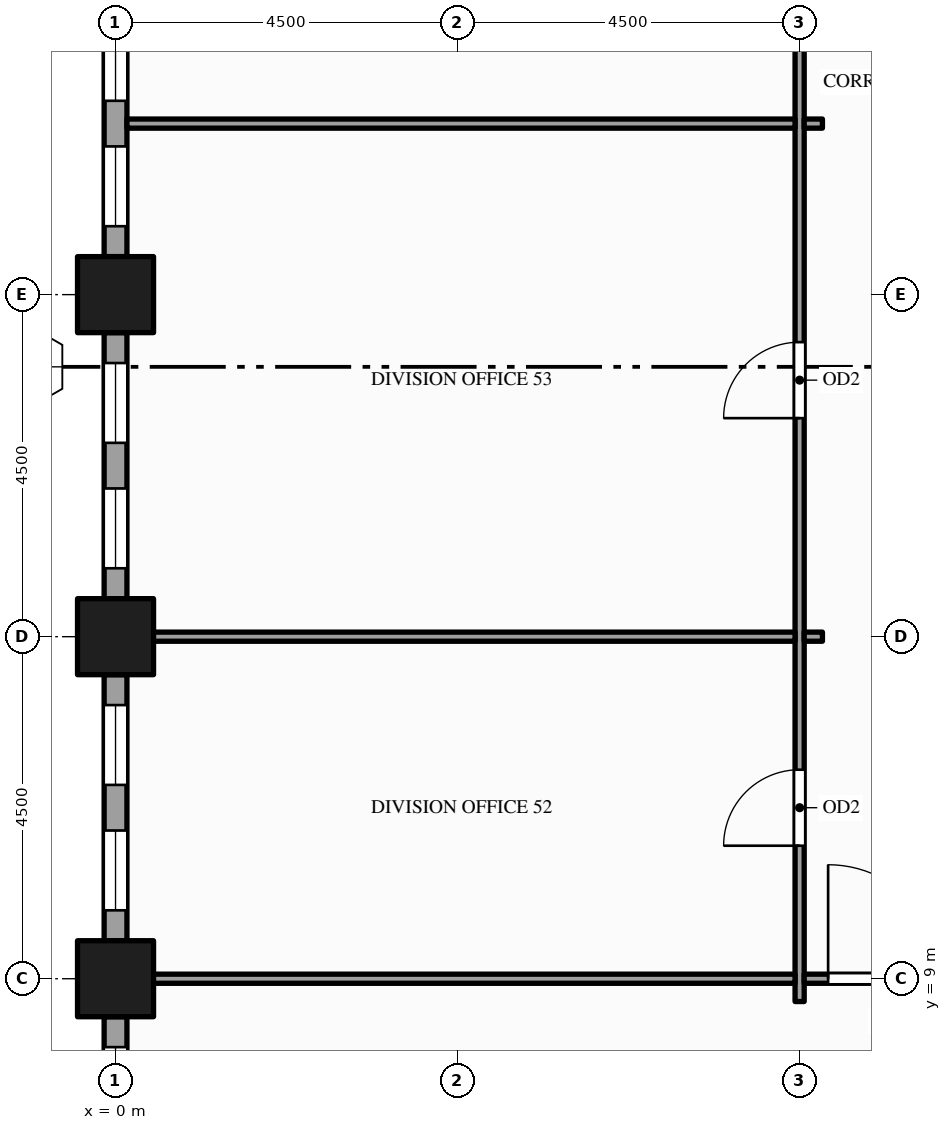
"""IFC4 building model, lengths in metres.
Left out: names, types, materials, properties, quantities, classifications, styles, units other than length and angle.
Written with IfcOpenShell. Run it as: python <this file> out.ifc"""

import sys

from ifc_helpers import new_model, si_unit, direction, frame, frame_2d, origin, origin_2d, place, context, subcontext, project, spatial, rectangle, hollow_rectangle, extrude, element, fill, save


model = new_model("IFC4")
c1 = context("Model", 3, precision=1e-05, world=origin(), true_north=direction((0.0, 1.0)))
c2 = subcontext(c1, "Body", "Model", "MODEL_VIEW")
j1 = project(units=[si_unit("LENGTHUNIT", "METRE"), si_unit("PLANEANGLEUNIT", "RADIAN")], contexts=[c1])
p1 = place(None, origin())
s1 = spatial("IfcSite", under=j1, at=p1, CompositionType="ELEMENT")
p2 = place(p1, origin())
s2 = spatial("IfcBuilding", under=s1, at=p2, CompositionType="ELEMENT")
p3 = place(p2, frame((0.0, 0.0, 103.0)))
s3 = spatial("IfcBuildingStorey", under=s2, at=p3, CompositionType="ELEMENT", Elevation=103.0)
for number, where, z_axis, x_axis in (
    (1, (0.0, 9.0, -0.15), (0.0, 0.0, 1.0), (1.0, 0.0, 0.0)),
    (2, (0.0, 13.5, -0.15), (0.0, 0.0, 1.0), (1.0, 0.0, 0.0)),
    (3, (0.0, 18.0, -0.15), (0.0, 0.0, 1.0), (1.0, 0.0, 0.0)),
):
    element("IfcColumn", number, at=place(p3, frame(where, z_axis=z_axis, x_axis=x_axis)), inside=s3, PredefinedType="COLUMN", context=c2, shape_type="SweptSolid", body=[
        extrude(hollow_rectangle(XDim=1.0, YDim=1.0, WallThickness=0.05, at=origin_2d()), origin(), (0.0, 0.0, 1.0), 4.0),
    ])
p4 = place(p3, frame((0.0, 22.0, 0.0), z_axis=(0.0, 0.0, 1.0), x_axis=(0.0, -1.0, 0.0)))
e4 = element("IfcWall", 4, at=p4, inside=s3, PredefinedType="STANDARD", context=c2, shape_type="SweptSolid", body=[
    extrude(rectangle(XDim=3.5, YDim=0.3, at=frame_2d((1.75, 0.0))), origin(), (0.0, 0.0, 1.0), 3.154),
])
p5 = place(p4, frame((0.4, 0.0, 0.9)))
e5 = element("IfcOpeningElement", 5, at=p5, cuts=e4, PredefinedType="OPENING", context=c2, shape_type="SweptSolid", body=[
    extrude(rectangle(XDim=1.05, YDim=2.0, at=frame_2d((0.525, 1.0))), frame((0.0, 0.16, 0.0), z_axis=(0.0, -1.0, 0.0), x_axis=(1.0, 0.0, 0.0)), (0.0, 0.0, 1.0), 0.32),
])
p6 = place(p4, frame((2.05, 0.0, 0.9)))
e6 = element("IfcOpeningElement", 6, at=p6, cuts=e4, PredefinedType="OPENING", context=c2, shape_type="SweptSolid", body=[
    extrude(rectangle(XDim=1.05, YDim=2.0, at=frame_2d((0.525, 1.0))), frame((0.0, 0.16, 0.0), z_axis=(0.0, -1.0, 0.0), x_axis=(1.0, 0.0, 0.0)), (0.0, 0.0, 1.0), 0.32),
])
p7 = place(p3, frame((0.0, 17.5, 0.0), z_axis=(0.0, 0.0, 1.0), x_axis=(0.0, -1.0, 0.0)))
e7 = element("IfcWall", 7, at=p7, inside=s3, PredefinedType="STANDARD", context=c2, shape_type="SweptSolid", body=[
    extrude(rectangle(XDim=3.5, YDim=0.3, at=frame_2d((1.75, 0.0))), origin(), (0.0, 0.0, 1.0), 3.154),
])
p8 = place(p7, frame((0.4, 0.0, 0.9)))
e8 = element("IfcOpeningElement", 8, at=p8, cuts=e7, PredefinedType="OPENING", context=c2, shape_type="SweptSolid", body=[
    extrude(rectangle(XDim=1.05, YDim=2.0, at=frame_2d((0.525, 1.0))), frame((0.0, 0.16, 0.0), z_axis=(0.0, -1.0, 0.0), x_axis=(1.0, 0.0, 0.0)), (0.0, 0.0, 1.0), 0.32),
])
p9 = place(p7, frame((2.05, 0.0, 0.9)))
e9 = element("IfcOpeningElement", 9, at=p9, cuts=e7, PredefinedType="OPENING", context=c2, shape_type="SweptSolid", body=[
    extrude(rectangle(XDim=1.05, YDim=2.0, at=frame_2d((0.525, 1.0))), frame((0.0, 0.16, 0.0), z_axis=(0.0, -1.0, 0.0), x_axis=(1.0, 0.0, 0.0)), (0.0, 0.0, 1.0), 0.32),
])
p10 = place(p3, frame((0.0, 13.0, 0.0), z_axis=(0.0, 0.0, 1.0), x_axis=(0.0, -1.0, 0.0)))
e10 = element("IfcWall", 10, at=p10, inside=s3, PredefinedType="STANDARD", context=c2, shape_type="SweptSolid", body=[
    extrude(rectangle(XDim=3.5, YDim=0.3, at=frame_2d((1.75, 0.0))), origin(), (0.0, 0.0, 1.0), 3.154),
])
p11 = place(p10, frame((0.4, 0.0, 0.9)))
e11 = element("IfcOpeningElement", 11, at=p11, cuts=e10, PredefinedType="OPENING", context=c2, shape_type="SweptSolid", body=[
    extrude(rectangle(XDim=1.05, YDim=2.0, at=frame_2d((0.525, 1.0))), frame((0.0, 0.16, 0.0), z_axis=(0.0, -1.0, 0.0), x_axis=(1.0, 0.0, 0.0)), (0.0, 0.0, 1.0), 0.32),
])
p12 = place(p10, frame((2.05, 0.0, 0.9)))
e12 = element("IfcOpeningElement", 12, at=p12, cuts=e10, PredefinedType="OPENING", context=c2, shape_type="SweptSolid", body=[
    extrude(rectangle(XDim=1.05, YDim=2.0, at=frame_2d((0.525, 1.0))), frame((0.0, 0.16, 0.0), z_axis=(0.0, -1.0, 0.0), x_axis=(1.0, 0.0, 0.0)), (0.0, 0.0, 1.0), 0.32),
])
p13 = place(p3, frame((0.0, 8.5, 0.0), z_axis=(0.0, 0.0, 1.0), x_axis=(0.0, -1.0, 0.0)))
e13 = element("IfcWall", 13, at=p13, inside=s3, PredefinedType="STANDARD", context=c2, shape_type="SweptSolid", body=[
    extrude(rectangle(XDim=3.5, YDim=0.3, at=frame_2d((1.75, 0.0))), origin(), (0.0, 0.0, 1.0), 3.154),
])
p14 = place(p13, frame((0.4, 0.0, 0.9)))
e14 = element("IfcOpeningElement", 14, at=p14, cuts=e13, PredefinedType="OPENING", context=c2, shape_type="SweptSolid", body=[
    extrude(rectangle(XDim=1.05, YDim=2.0, at=frame_2d((0.525, 1.0))), frame((0.0, 0.16, 0.0), z_axis=(0.0, -1.0, 0.0), x_axis=(1.0, 0.0, 0.0)), (0.0, 0.0, 1.0), 0.32),
])
p15 = place(p13, frame((2.05, 0.0, 0.9)))
e15 = element("IfcOpeningElement", 15, at=p15, cuts=e13, PredefinedType="OPENING", context=c2, shape_type="SweptSolid", body=[
    extrude(rectangle(XDim=1.05, YDim=2.0, at=frame_2d((0.525, 1.0))), frame((0.0, 0.16, 0.0), z_axis=(0.0, -1.0, 0.0), x_axis=(1.0, 0.0, 0.0)), (0.0, 0.0, 1.0), 0.32),
])
p16 = place(p3, frame((9.0, 8.7, 0.0), z_axis=(0.0, 0.0, 1.0), x_axis=(0.0, 1.0, 0.0)))
e16 = element("IfcWall", 16, at=p16, inside=s3, PredefinedType="PARTITIONING", context=c2, shape_type="SweptSolid", body=[
    extrude(rectangle(XDim=23.1, YDim=0.12, at=frame_2d((11.55, 0.0))), origin(), (0.0, 0.0, 1.0), 2.6),
])
p17 = place(p16, frame((2.05, 0.0, 0.0)))
e17 = element("IfcOpeningElement", 17, at=p17, cuts=e16, PredefinedType="OPENING", context=c2, shape_type="SweptSolid", body=[
    extrude(rectangle(XDim=1.0, YDim=2.1, at=frame_2d((0.5, 1.05))), frame((0.0, 0.07, 0.0), z_axis=(0.0, -1.0, 0.0), x_axis=(1.0, 0.0, 0.0)), (0.0, 0.0, 1.0), 0.14),
])
p18 = place(p16, frame((7.675, 0.0, 0.0)))
e18 = element("IfcOpeningElement", 18, at=p18, cuts=e16, PredefinedType="OPENING", context=c2, shape_type="SweptSolid", body=[
    extrude(rectangle(XDim=1.0, YDim=2.1, at=frame_2d((0.5, 1.05))), frame((0.0, 0.07, 0.0), z_axis=(0.0, -1.0, 0.0), x_axis=(1.0, 0.0, 0.0)), (0.0, 0.0, 1.0), 0.14),
])
p19 = place(p16, frame((14.355, 0.0, 0.0)))
e19 = element("IfcOpeningElement", 19, at=p19, cuts=e16, PredefinedType="OPENING", context=c2, shape_type="SweptSolid", body=[
    extrude(rectangle(XDim=1.2, YDim=2.1, at=frame_2d((0.6, 1.05))), frame((0.0, 0.07, 0.0), z_axis=(0.0, -1.0, 0.0), x_axis=(1.0, 0.0, 0.0)), (0.0, 0.0, 1.0), 0.14),
])
p20 = place(p3, frame((0.15, 9.0, 0.0), z_axis=(0.0, 0.0, 1.0), x_axis=(1.0, 0.0, 0.0)))
e20 = element("IfcWall", 20, at=p20, inside=s3, PredefinedType="PARTITIONING", context=c2, shape_type="SweptSolid", body=[
    extrude(rectangle(XDim=8.79, YDim=0.12, at=frame_2d((4.395, 0.0))), origin(), (0.0, 0.0, 1.0), 2.938),
])
p21 = place(p3, frame((9.06, 9.0, 0.0), z_axis=(0.0, 0.0, 1.0), x_axis=(1.0, 0.0, 0.0)))
e21 = element("IfcWall", 21, at=p21, inside=s3, PredefinedType="PARTITIONING", context=c2, shape_type="SweptSolid", body=[
    extrude(rectangle(XDim=2.13, YDim=0.12, at=frame_2d((1.065, 0.0))), origin(), (0.0, 0.0, 1.0), 2.938),
])
p22 = place(p21, frame((0.315, 0.0, 0.0)))
e22 = element("IfcOpeningElement", 22, at=p22, cuts=e21, PredefinedType="OPENING", context=c2, shape_type="SweptSolid", body=[
    extrude(rectangle(XDim=1.5, YDim=2.1, at=frame_2d((0.75, 1.05))), frame((0.0, 0.07, 0.0), z_axis=(0.0, -1.0, 0.0), x_axis=(1.0, 0.0, 0.0)), (0.0, 0.0, 1.0), 0.14),
])
p23 = place(p3, frame((0.15, 13.5, 0.0), z_axis=(0.0, 0.0, 1.0), x_axis=(1.0, 0.0, 0.0)))
e23 = element("IfcWall", 23, at=p23, inside=s3, PredefinedType="PARTITIONING", context=c2, shape_type="SweptSolid", body=[
    extrude(rectangle(XDim=8.79, YDim=0.12, at=frame_2d((4.395, 0.0))), origin(), (0.0, 0.0, 1.0), 2.938),
])
p24 = place(p3, frame((9.06, 13.5, 0.0), z_axis=(0.0, 0.0, 1.0), x_axis=(1.0, 0.0, 0.0)))
e24 = element("IfcWall", 24, at=p24, inside=s3, PredefinedType="PARTITIONING", context=c2, shape_type="SweptSolid", body=[
    extrude(rectangle(XDim=0.24, YDim=0.12, at=frame_2d((0.12, 0.0))), origin(), (0.0, 0.0, 1.0), 2.938),
])
p25 = place(p3, frame((0.15, 20.25, 0.0), z_axis=(0.0, 0.0, 1.0), x_axis=(1.0, 0.0, 0.0)))
e25 = element("IfcWall", 25, at=p25, inside=s3, PredefinedType="PARTITIONING", context=c2, shape_type="SweptSolid", body=[
    extrude(rectangle(XDim=8.79, YDim=0.12, at=frame_2d((4.395, 0.0))), origin(), (0.0, 0.0, 1.0), 2.938),
])
p26 = place(p3, frame((9.06, 20.25, 0.0), z_axis=(0.0, 0.0, 1.0), x_axis=(1.0, 0.0, 0.0)))
e26 = element("IfcWall", 26, at=p26, inside=s3, PredefinedType="PARTITIONING", context=c2, shape_type="SweptSolid", body=[
    extrude(rectangle(XDim=0.24, YDim=0.12, at=frame_2d((0.12, 0.0))), origin(), (0.0, 0.0, 1.0), 2.938),
])
p27 = place(p5, origin())
e27 = element("IfcWindow", 27, at=p27, inside=s3, PartitioningType="SINGLE_PANEL", PredefinedType="WINDOW", context=c2, shape_type="SweptSolid", body=[
    extrude(rectangle(XDim=1.05, YDim=2.0, at=frame_2d((0.525, 1.0))), frame((0.0, 0.03, 0.0), z_axis=(0.0, -1.0, 0.0), x_axis=(1.0, 0.0, 0.0)), (0.0, 0.0, 1.0), 0.06),
])
fill(e5, e27)
p28 = place(p6, origin())
e28 = element("IfcWindow", 28, at=p28, inside=s3, PartitioningType="SINGLE_PANEL", PredefinedType="WINDOW", context=c2, shape_type="SweptSolid", body=[
    extrude(rectangle(XDim=1.05, YDim=2.0, at=frame_2d((0.525, 1.0))), frame((0.0, 0.03, 0.0), z_axis=(0.0, -1.0, 0.0), x_axis=(1.0, 0.0, 0.0)), (0.0, 0.0, 1.0), 0.06),
])
fill(e6, e28)
p29 = place(p8, origin())
e29 = element("IfcWindow", 29, at=p29, inside=s3, PartitioningType="SINGLE_PANEL", PredefinedType="WINDOW", context=c2, shape_type="SweptSolid", body=[
    extrude(rectangle(XDim=1.05, YDim=2.0, at=frame_2d((0.525, 1.0))), frame((0.0, 0.03, 0.0), z_axis=(0.0, -1.0, 0.0), x_axis=(1.0, 0.0, 0.0)), (0.0, 0.0, 1.0), 0.06),
])
fill(e8, e29)
p30 = place(p9, origin())
e30 = element("IfcWindow", 30, at=p30, inside=s3, PartitioningType="SINGLE_PANEL", PredefinedType="WINDOW", context=c2, shape_type="SweptSolid", body=[
    extrude(rectangle(XDim=1.05, YDim=2.0, at=frame_2d((0.525, 1.0))), frame((0.0, 0.03, 0.0), z_axis=(0.0, -1.0, 0.0), x_axis=(1.0, 0.0, 0.0)), (0.0, 0.0, 1.0), 0.06),
])
fill(e9, e30)
p31 = place(p11, origin())
e31 = element("IfcWindow", 31, at=p31, inside=s3, PartitioningType="SINGLE_PANEL", PredefinedType="WINDOW", context=c2, shape_type="SweptSolid", body=[
    extrude(rectangle(XDim=1.05, YDim=2.0, at=frame_2d((0.525, 1.0))), frame((0.0, 0.03, 0.0), z_axis=(0.0, -1.0, 0.0), x_axis=(1.0, 0.0, 0.0)), (0.0, 0.0, 1.0), 0.06),
])
fill(e11, e31)
p32 = place(p12, origin())
e32 = element("IfcWindow", 32, at=p32, inside=s3, PartitioningType="SINGLE_PANEL", PredefinedType="WINDOW", context=c2, shape_type="SweptSolid", body=[
    extrude(rectangle(XDim=1.05, YDim=2.0, at=frame_2d((0.525, 1.0))), frame((0.0, 0.03, 0.0), z_axis=(0.0, -1.0, 0.0), x_axis=(1.0, 0.0, 0.0)), (0.0, 0.0, 1.0), 0.06),
])
fill(e12, e32)
p33 = place(p14, origin())
e33 = element("IfcWindow", 33, at=p33, inside=s3, PartitioningType="SINGLE_PANEL", PredefinedType="WINDOW", context=c2, shape_type="SweptSolid", body=[
    extrude(rectangle(XDim=1.05, YDim=2.0, at=frame_2d((0.525, 1.0))), frame((0.0, 0.03, 0.0), z_axis=(0.0, -1.0, 0.0), x_axis=(1.0, 0.0, 0.0)), (0.0, 0.0, 1.0), 0.06),
])
fill(e14, e33)
p34 = place(p22, origin())
e34 = element("IfcDoor", 34, at=p34, inside=s3, OperationType="SINGLE_SWING_LEFT", PredefinedType="DOOR", context=c2, shape_type="SweptSolid", body=[
    extrude(rectangle(XDim=1.5, YDim=2.1, at=frame_2d((0.75, 1.05))), frame((0.0, 0.025, 0.0), z_axis=(0.0, -1.0, 0.0), x_axis=(1.0, 0.0, 0.0)), (0.0, 0.0, 1.0), 0.05),
])
fill(e22, e34)
p35 = place(p17, origin())
e35 = element("IfcDoor", 35, at=p35, inside=s3, OperationType="SINGLE_SWING_LEFT", PredefinedType="DOOR", context=c2, shape_type="SweptSolid", body=[
    extrude(rectangle(XDim=1.0, YDim=2.1, at=frame_2d((0.5, 1.05))), frame((0.0, 0.025, 0.0), z_axis=(0.0, -1.0, 0.0), x_axis=(1.0, 0.0, 0.0)), (0.0, 0.0, 1.0), 0.05),
])
fill(e17, e35)
p36 = place(p18, origin())
e36 = element("IfcDoor", 36, at=p36, inside=s3, OperationType="SINGLE_SWING_LEFT", PredefinedType="DOOR", context=c2, shape_type="SweptSolid", body=[
    extrude(rectangle(XDim=1.0, YDim=2.1, at=frame_2d((0.5, 1.05))), frame((0.0, 0.025, 0.0), z_axis=(0.0, -1.0, 0.0), x_axis=(1.0, 0.0, 0.0)), (0.0, 0.0, 1.0), 0.05),
])
fill(e18, e36)
save(model, sys.argv[1])
